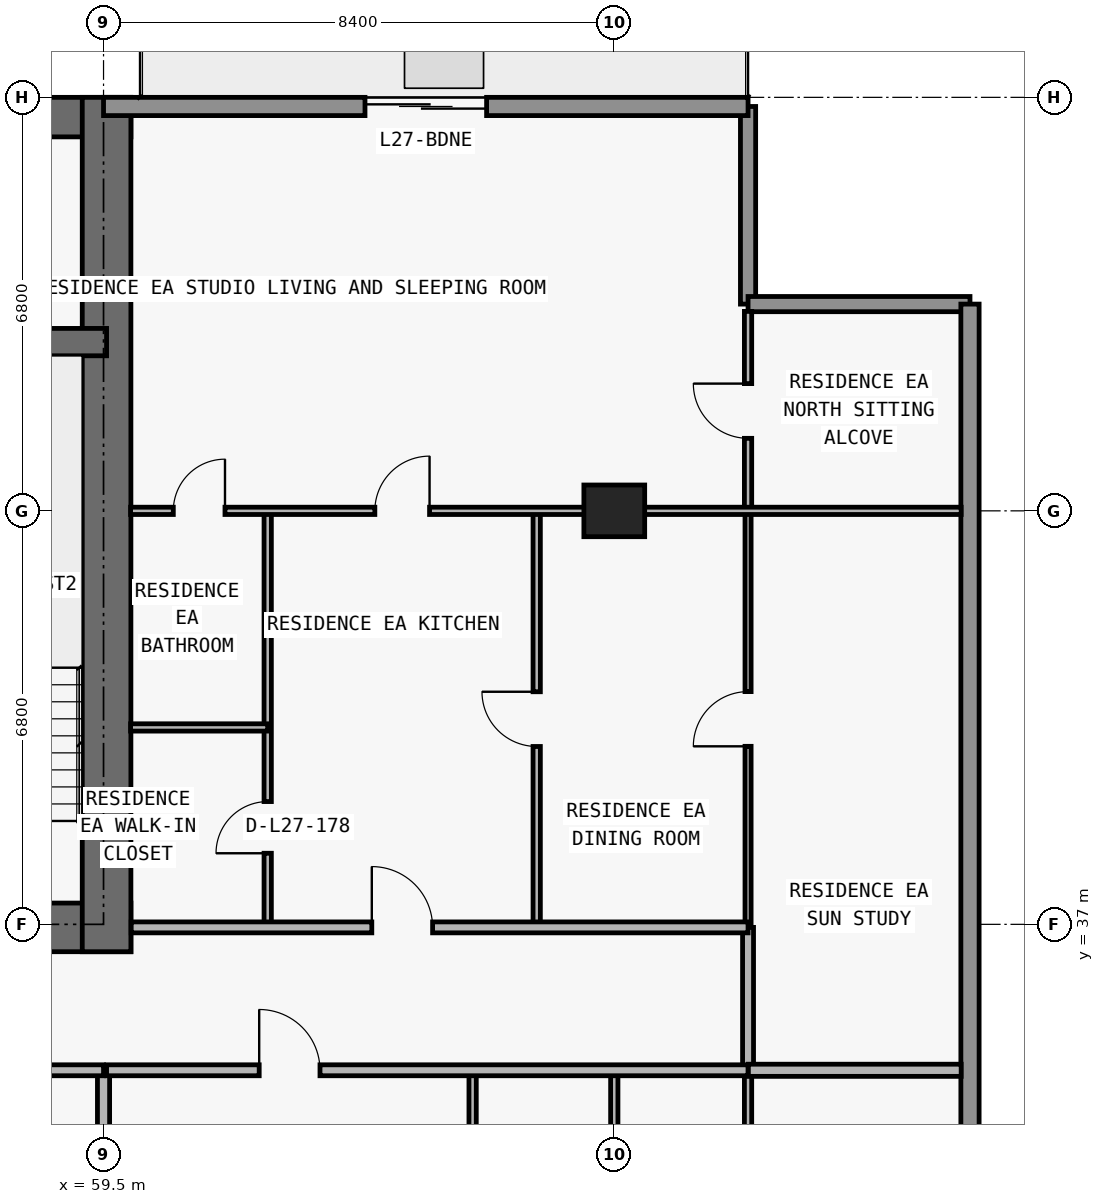
"""IFC4 building model, lengths in metres.
Left out: names, types, materials, properties, quantities, classifications, styles, units other than length and angle.
Written with IfcOpenShell. Run it as: python <this file> out.ifc"""

import sys

from ifc_helpers import new_model, si_unit, direction, frame, frame_2d, origin, origin_2d, place, context, subcontext, project, spatial, rectangle, extrude, element, fill, save


model = new_model("IFC4")
c1 = context("Model", 3, precision=1e-05, world=origin(), true_north=direction((0.0, 1.0)))
c2 = subcontext(c1, "Body", "Model", "MODEL_VIEW")
j1 = project(units=[si_unit("LENGTHUNIT", "METRE"), si_unit("PLANEANGLEUNIT", "RADIAN")], contexts=[c1])
p1 = place(None, origin())
s1 = spatial("IfcSite", under=j1, at=p1, CompositionType="ELEMENT")
p2 = place(p1, origin())
s2 = spatial("IfcBuilding", under=s1, at=p2, CompositionType="ELEMENT")
p3 = place(p2, frame((0.0, 0.0, 102.6)))
s3 = spatial("IfcBuildingStorey", under=s2, at=p3, CompositionType="ELEMENT", Elevation=102.6)
p4 = place(p3, frame((67.9, 43.8, 0.0), z_axis=(0.0, 0.0, 1.0), x_axis=(1.0, 0.0, 0.0)))
e1 = element("IfcColumn", 1, at=p4, inside=s3, PredefinedType="COLUMN", context=c2, shape_type="SweptSolid", body=[
    extrude(rectangle(XDim=1.0, YDim=0.85, at=origin_2d()), origin(), (0.0, 0.0, 1.0), 3.05),
])
p5 = place(p3, frame((17.85, 36.95, 0.0), z_axis=(0.0, 0.0, 1.0), x_axis=(1.0, 0.0, 0.0)))
e2 = element("IfcWall", 2, at=p5, inside=s3, PredefinedType="SHEAR", context=c2, shape_type="SweptSolid", body=[
    extrude(rectangle(XDim=42.1, YDim=0.8, at=frame_2d((21.05, 0.0))), origin(), (0.0, 0.0, 1.0), 3.05),
])
p6 = place(p5, frame((14.45, 0.0, 0.0)))
e3 = element("IfcOpeningElement", 3, at=p6, cuts=e2, PredefinedType="OPENING", context=c2, shape_type="SweptSolid", body=[
    extrude(rectangle(XDim=1.1, YDim=2.15, at=frame_2d((0.55, 1.075))), frame((0.0, 0.41, 0.0), z_axis=(0.0, -1.0, 0.0), x_axis=(1.0, 0.0, 0.0)), (0.0, 0.0, 1.0), 0.82),
])
p7 = place(p5, frame((6.3, 0.0, 0.0)))
e4 = element("IfcOpeningElement", 4, at=p7, cuts=e2, PredefinedType="OPENING", context=c2, shape_type="SweptSolid", body=[
    extrude(rectangle(XDim=1.05, YDim=2.15, at=frame_2d((0.525, 1.075))), frame((0.0, 0.41, 0.0), z_axis=(0.0, -1.0, 0.0), x_axis=(1.0, 0.0, 0.0)), (0.0, 0.0, 1.0), 0.82),
])
p8 = place(p5, frame((34.8, 0.0, 0.0)))
e5 = element("IfcOpeningElement", 5, at=p8, cuts=e2, PredefinedType="OPENING", context=c2, shape_type="SweptSolid", body=[
    extrude(rectangle(XDim=1.05, YDim=2.15, at=frame_2d((0.525, 1.075))), frame((0.0, 0.41, 0.0), z_axis=(0.0, -1.0, 0.0), x_axis=(1.0, 0.0, 0.0)), (0.0, 0.0, 1.0), 0.82),
])
p9 = place(p5, frame((10.913, 0.0, 0.0)))
e6 = element("IfcOpeningElement", 6, at=p9, cuts=e2, PredefinedType="OPENING", context=c2, shape_type="SweptSolid", body=[
    extrude(rectangle(XDim=1.05, YDim=2.15, at=frame_2d((0.525, 1.075))), frame((0.0, 0.41, 0.0), z_axis=(0.0, -1.0, 0.0), x_axis=(1.0, 0.0, 0.0)), (0.0, 0.0, 1.0), 0.82),
])
p10 = place(p5, frame((24.15, 0.0, 0.0)))
e7 = element("IfcOpeningElement", 7, at=p10, cuts=e2, PredefinedType="OPENING", context=c2, shape_type="SweptSolid", body=[
    extrude(rectangle(XDim=1.05, YDim=2.15, at=frame_2d((0.525, 1.075))), frame((0.0, 0.41, 0.0), z_axis=(0.0, -1.0, 0.0), x_axis=(1.0, 0.0, 0.0)), (0.0, 0.0, 1.0), 0.82),
])
p11 = place(p3, frame((17.85, 50.275, 0.0), z_axis=(0.0, 0.0, 1.0), x_axis=(1.0, 0.0, 0.0)))
e8 = element("IfcWall", 8, at=p11, inside=s3, PredefinedType="SHEAR", context=c2, shape_type="SweptSolid", body=[
    extrude(rectangle(XDim=42.1, YDim=0.65, at=frame_2d((21.05, 0.0))), origin(), (0.0, 0.0, 1.0), 3.05),
])
p12 = place(p3, frame((59.55, 36.55, 0.0), z_axis=(0.0, 0.0, 1.0), x_axis=(0.0, 1.0, 0.0)))
e9 = element("IfcWall", 9, at=p12, inside=s3, PredefinedType="SHEAR", context=c2, shape_type="SweptSolid", body=[
    extrude(rectangle(XDim=14.05, YDim=0.8, at=frame_2d((7.025, 0.0))), origin(), (0.0, 0.0, 1.0), 3.05),
])
p13 = place(p3, frame((18.25, 46.575, 0.0), z_axis=(0.0, 0.0, 1.0), x_axis=(1.0, 0.0, 0.0)))
e10 = element("IfcWall", 10, at=p13, inside=s3, PredefinedType="SHEAR", context=c2, shape_type="SweptSolid", body=[
    extrude(rectangle(XDim=41.3, YDim=0.45, at=frame_2d((20.65, 0.0))), origin(), (0.0, 0.0, 1.0), 3.05),
])
p14 = place(p13, frame((7.65, 0.0, 0.0)))
e11 = element("IfcOpeningElement", 11, at=p14, cuts=e10, PredefinedType="OPENING", context=c2, shape_type="SweptSolid", body=[
    extrude(rectangle(XDim=1.0, YDim=2.2, at=frame_2d((0.5, 1.1))), frame((0.0, 0.235, 0.0), z_axis=(0.0, -1.0, 0.0), x_axis=(1.0, 0.0, 0.0)), (0.0, 0.0, 1.0), 0.47),
])
p15 = place(p13, frame((32.675, 0.0, 0.0)))
e12 = element("IfcOpeningElement", 12, at=p15, cuts=e10, PredefinedType="OPENING", context=c2, shape_type="SweptSolid", body=[
    extrude(rectangle(XDim=1.05, YDim=2.15, at=frame_2d((0.525, 1.075))), frame((0.0, 0.235, 0.0), z_axis=(0.0, -1.0, 0.0), x_axis=(1.0, 0.0, 0.0)), (0.0, 0.0, 1.0), 0.47),
])
p16 = place(p3, frame((70.1, 50.45, 0.0), z_axis=(0.0, 0.0, 1.0), x_axis=(0.0, -1.0, 0.0)))
e13 = element("IfcWall", 13, at=p16, inside=s3, PredefinedType="ELEMENTEDWALL", context=c2, shape_type="SweptSolid", body=[
    extrude(rectangle(XDim=3.25, YDim=0.25, at=frame_2d((1.625, 0.0))), origin(), (0.0, 0.0, 1.0), 3.05),
])
p17 = place(p3, frame((70.1, 47.2, 0.0), z_axis=(0.0, 0.0, 1.0), x_axis=(1.0, 0.0, 0.0)))
e14 = element("IfcWall", 14, at=p17, inside=s3, PredefinedType="ELEMENTEDWALL", context=c2, shape_type="SweptSolid", body=[
    extrude(rectangle(XDim=3.65, YDim=0.25, at=frame_2d((1.825, 0.0))), origin(), (0.0, 0.0, 1.0), 3.05),
])
p18 = place(p3, frame((73.75, 47.2, 0.0), z_axis=(0.0, 0.0, 1.0), x_axis=(0.0, -1.0, 0.0)))
e15 = element("IfcWall", 15, at=p18, inside=s3, PredefinedType="STANDARD", context=c2, shape_type="SweptSolid", body=[
    extrude(rectangle(XDim=19.2, YDim=0.3, at=frame_2d((9.6, 0.0))), origin(), (0.0, 0.0, 1.0), 3.05),
])
p19 = place(p3, frame((59.5, 50.45, 0.0), z_axis=(0.0, 0.0, 1.0), x_axis=(1.0, 0.0, 0.0)))
e16 = element("IfcWall", 16, at=p19, inside=s3, PredefinedType="STANDARD", context=c2, shape_type="SweptSolid", body=[
    extrude(rectangle(XDim=10.6, YDim=0.3, at=frame_2d((5.3, 0.0))), origin(), (0.0, 0.0, 1.0), 3.05),
])
p20 = place(p19, frame((4.3, 0.0, 0.0)))
e17 = element("IfcOpeningElement", 17, at=p20, cuts=e16, PredefinedType="OPENING", context=c2, shape_type="SweptSolid", body=[
    extrude(rectangle(XDim=2.0, YDim=2.3, at=frame_2d((1.0, 1.15))), frame((0.0, 0.16, 0.0), z_axis=(0.0, -1.0, 0.0), x_axis=(1.0, 0.0, 0.0)), (0.0, 0.0, 1.0), 0.32),
])
p21 = place(p3, frame((59.5, 30.24, 0.0), z_axis=(0.0, 0.0, 1.0), x_axis=(0.0, 1.0, 0.0)))
e18 = element("IfcWall", 18, at=p21, inside=s3, PredefinedType="PARTITIONING", context=c2, shape_type="SweptSolid", body=[
    extrude(rectangle(XDim=4.36, YDim=0.2, at=frame_2d((2.18, 0.0))), origin(), (0.0, 0.0, 1.0), 2.174),
])
p22 = place(p3, frame((62.2, 36.95, 0.0), z_axis=(0.0, 0.0, 1.0), x_axis=(0.0, 1.0, 0.0)))
e19 = element("IfcWall", 19, at=p22, inside=s3, PredefinedType="PARTITIONING", context=c2, shape_type="SweptSolid", body=[
    extrude(rectangle(XDim=6.85, YDim=0.12, at=frame_2d((3.425, 0.0))), origin(), (0.0, 0.0, 1.0), 3.05),
])
p23 = place(p22, frame((1.219, 0.0, 0.0)))
e20 = element("IfcOpeningElement", 20, at=p23, cuts=e19, PredefinedType="OPENING", context=c2, shape_type="SweptSolid", body=[
    extrude(rectangle(XDim=0.85, YDim=2.1, at=frame_2d((0.425, 1.05))), frame((0.0, 0.07, 0.0), z_axis=(0.0, -1.0, 0.0), x_axis=(1.0, 0.0, 0.0)), (0.0, 0.0, 1.0), 0.14),
])
p24 = place(p3, frame((65.57, 30.24, 0.0), z_axis=(0.0, 0.0, 1.0), x_axis=(0.0, 1.0, 0.0)))
e21 = element("IfcWall", 21, at=p24, inside=s3, PredefinedType="PARTITIONING", context=c2, shape_type="SweptSolid", body=[
    extrude(rectangle(XDim=4.36, YDim=0.12, at=frame_2d((2.18, 0.0))), origin(), (0.0, 0.0, 1.0), 3.05),
])
p25 = place(p24, frame((1.755, 0.0, 0.0)))
e22 = element("IfcOpeningElement", 22, at=p25, cuts=e21, PredefinedType="OPENING", context=c2, shape_type="SweptSolid", body=[
    extrude(rectangle(XDim=0.85, YDim=2.1, at=frame_2d((0.425, 1.05))), frame((0.0, 0.07, 0.0), z_axis=(0.0, -1.0, 0.0), x_axis=(1.0, 0.0, 0.0)), (0.0, 0.0, 1.0), 0.14),
])
p26 = place(p3, frame((66.624, 36.95, 0.0), z_axis=(0.0, 0.0, 1.0), x_axis=(0.0, 1.0, 0.0)))
e23 = element("IfcWall", 23, at=p26, inside=s3, PredefinedType="PARTITIONING", context=c2, shape_type="SweptSolid", body=[
    extrude(rectangle(XDim=6.85, YDim=0.12, at=frame_2d((3.425, 0.0))), origin(), (0.0, 0.0, 1.0), 3.05),
])
p27 = place(p26, frame((2.975, 0.0, 0.0)))
e24 = element("IfcOpeningElement", 24, at=p27, cuts=e23, PredefinedType="OPENING", context=c2, shape_type="SweptSolid", body=[
    extrude(rectangle(XDim=0.9, YDim=2.15, at=frame_2d((0.45, 1.075))), frame((0.0, 0.07, 0.0), z_axis=(0.0, -1.0, 0.0), x_axis=(1.0, 0.0, 0.0)), (0.0, 0.0, 1.0), 0.14),
])
p28 = place(p3, frame((67.9, 30.24, 0.0), z_axis=(0.0, 0.0, 1.0), x_axis=(0.0, 1.0, 0.0)))
e25 = element("IfcWall", 25, at=p28, inside=s3, PredefinedType="PARTITIONING", context=c2, shape_type="SweptSolid", body=[
    extrude(rectangle(XDim=4.36, YDim=0.12, at=frame_2d((2.18, 0.0))), origin(), (0.0, 0.0, 1.0), 2.174),
])
p29 = place(p3, frame((70.1, 30.24, 0.0), z_axis=(0.0, 0.0, 1.0), x_axis=(0.0, 1.0, 0.0)))
e26 = element("IfcWall", 26, at=p29, inside=s3, PredefinedType="PARTITIONING", context=c2, shape_type="SweptSolid", body=[
    extrude(rectangle(XDim=4.36, YDim=0.12, at=frame_2d((2.18, 0.0))), origin(), (0.0, 0.0, 1.0), 3.05),
])
p30 = place(p3, frame((70.1, 34.605, 0.0), z_axis=(0.0, 0.0, 1.0), x_axis=(0.0, 1.0, 0.0)))
e27 = element("IfcWall", 27, at=p30, inside=s3, PredefinedType="PARTITIONING", context=c2, shape_type="SweptSolid", body=[
    extrude(rectangle(XDim=2.345, YDim=0.18, at=frame_2d((1.172, 0.0))), origin(), (0.0, 0.0, 1.0), 3.05),
])
p31 = place(p3, frame((70.1, 36.955, 0.0), z_axis=(0.0, 0.0, 1.0), x_axis=(0.0, 1.0, 0.0)))
e28 = element("IfcWall", 28, at=p31, inside=s3, PredefinedType="MOVABLE", context=c2, shape_type="SweptSolid", body=[
    extrude(rectangle(XDim=6.845, YDim=0.1, at=frame_2d((3.422, 0.0))), origin(), (0.0, 0.0, 1.0), 3.05),
])
p32 = place(p31, frame((2.972, 0.0, 0.0)))
e29 = element("IfcOpeningElement", 29, at=p32, cuts=e28, PredefinedType="OPENING", context=c2, shape_type="SweptSolid", body=[
    extrude(rectangle(XDim=0.9, YDim=2.15, at=frame_2d((0.45, 1.075))), frame((0.0, 0.06, 0.0), z_axis=(0.0, -1.0, 0.0), x_axis=(1.0, 0.0, 0.0)), (0.0, 0.0, 1.0), 0.12),
])
p33 = place(p3, frame((70.1, 43.805, 0.0), z_axis=(0.0, 0.0, 1.0), x_axis=(0.0, 1.0, 0.0)))
e30 = element("IfcWall", 30, at=p33, inside=s3, PredefinedType="PARTITIONING", context=c2, shape_type="SweptSolid", body=[
    extrude(rectangle(XDim=3.275, YDim=0.12, at=frame_2d((1.638, 0.0))), origin(), (0.0, 0.0, 1.0), 3.05),
])
p34 = place(p33, frame((1.188, 0.0, 0.0)))
e31 = element("IfcOpeningElement", 31, at=p34, cuts=e30, PredefinedType="OPENING", context=c2, shape_type="SweptSolid", body=[
    extrude(rectangle(XDim=0.9, YDim=2.15, at=frame_2d((0.45, 1.075))), frame((0.0, 0.07, 0.0), z_axis=(0.0, -1.0, 0.0), x_axis=(1.0, 0.0, 0.0)), (0.0, 0.0, 1.0), 0.14),
])
p35 = place(p3, frame((18.3, 34.6, 0.0), z_axis=(0.0, 0.0, 1.0), x_axis=(1.0, 0.0, 0.0)))
e32 = element("IfcWall", 32, at=p35, inside=s3, PredefinedType="PARTITIONING", context=c2, shape_type="SweptSolid", body=[
    extrude(rectangle(XDim=41.2, YDim=0.18, at=frame_2d((20.6, 0.0))), origin(), (0.0, 0.0, 1.0), 3.05),
])
p36 = place(p35, frame((2.691, 0.0, 0.0)))
e33 = element("IfcOpeningElement", 33, at=p36, cuts=e32, PredefinedType="OPENING", context=c2, shape_type="SweptSolid", body=[
    extrude(rectangle(XDim=1.0, YDim=2.2, at=frame_2d((0.5, 1.1))), frame((0.0, 0.1, 0.0), z_axis=(0.0, -1.0, 0.0), x_axis=(1.0, 0.0, 0.0)), (0.0, 0.0, 1.0), 0.2),
])
p37 = place(p35, frame((11.212, 0.0, 0.0)))
e34 = element("IfcOpeningElement", 34, at=p37, cuts=e32, PredefinedType="OPENING", context=c2, shape_type="SweptSolid", body=[
    extrude(rectangle(XDim=1.0, YDim=2.2, at=frame_2d((0.5, 1.1))), frame((0.0, 0.1, 0.0), z_axis=(0.0, -1.0, 0.0), x_axis=(1.0, 0.0, 0.0)), (0.0, 0.0, 1.0), 0.2),
])
p38 = place(p35, frame((35.504, 0.0, 0.0)))
e35 = element("IfcOpeningElement", 35, at=p38, cuts=e32, PredefinedType="OPENING", context=c2, shape_type="SweptSolid", body=[
    extrude(rectangle(XDim=1.0, YDim=2.2, at=frame_2d((0.5, 1.1))), frame((0.0, 0.1, 0.0), z_axis=(0.0, -1.0, 0.0), x_axis=(1.0, 0.0, 0.0)), (0.0, 0.0, 1.0), 0.2),
])
p39 = place(p3, frame((59.55, 34.6, 0.0), z_axis=(0.0, 0.0, 1.0), x_axis=(1.0, 0.0, 0.0)))
e36 = element("IfcWall", 36, at=p39, inside=s3, PredefinedType="PARTITIONING", context=c2, shape_type="SweptSolid", body=[
    extrude(rectangle(XDim=10.55, YDim=0.18, at=frame_2d((5.275, 0.0))), origin(), (0.0, 0.0, 1.0), 3.05),
])
p40 = place(p39, frame((2.51, 0.0, 0.0)))
e37 = element("IfcOpeningElement", 37, at=p40, cuts=e36, PredefinedType="OPENING", context=c2, shape_type="SweptSolid", body=[
    extrude(rectangle(XDim=1.0, YDim=2.2, at=frame_2d((0.5, 1.1))), frame((0.0, 0.1, 0.0), z_axis=(0.0, -1.0, 0.0), x_axis=(1.0, 0.0, 0.0)), (0.0, 0.0, 1.0), 0.2),
])
p41 = place(p3, frame((70.105, 34.6, 0.0), z_axis=(0.0, 0.0, 1.0), x_axis=(1.0, 0.0, 0.0)))
e38 = element("IfcWall", 38, at=p41, inside=s3, PredefinedType="PARTITIONING", context=c2, shape_type="SweptSolid", body=[
    extrude(rectangle(XDim=3.5, YDim=0.2, at=frame_2d((1.75, 0.0))), origin(), (0.0, 0.0, 1.0), 3.05),
])
p42 = place(p3, frame((59.955, 36.95, 0.0), z_axis=(0.0, 0.0, 1.0), x_axis=(1.0, 0.0, 0.0)))
e39 = element("IfcWall", 39, at=p42, inside=s3, PredefinedType="PARTITIONING", context=c2, shape_type="SweptSolid", body=[
    extrude(rectangle(XDim=10.145, YDim=0.18, at=frame_2d((5.073, 0.0))), origin(), (0.0, 0.0, 1.0), 3.05),
])
p43 = place(p42, frame((3.957, 0.0, 0.0)))
e40 = element("IfcOpeningElement", 40, at=p43, cuts=e39, PredefinedType="OPENING", context=c2, shape_type="SweptSolid", body=[
    extrude(rectangle(XDim=1.0, YDim=2.2, at=frame_2d((0.5, 1.1))), frame((0.0, 0.1, 0.0), z_axis=(0.0, -1.0, 0.0), x_axis=(1.0, 0.0, 0.0)), (0.0, 0.0, 1.0), 0.2),
])
p44 = place(p3, frame((59.945, 40.238, 0.0), z_axis=(0.0, 0.0, 1.0), x_axis=(1.0, 0.0, 0.0)))
e41 = element("IfcWall", 41, at=p44, inside=s3, PredefinedType="PARTITIONING", context=c2, shape_type="SweptSolid", body=[
    extrude(rectangle(XDim=2.255, YDim=0.12, at=frame_2d((1.127, 0.0))), origin(), (0.0, 0.0, 1.0), 3.05),
])
p45 = place(p3, frame((59.945, 43.8, 0.0), z_axis=(0.0, 0.0, 1.0), x_axis=(1.0, 0.0, 0.0)))
e42 = element("IfcWall", 42, at=p45, inside=s3, PredefinedType="PARTITIONING", context=c2, shape_type="SweptSolid", body=[
    extrude(rectangle(XDim=13.66, YDim=0.12, at=frame_2d((6.83, 0.0))), origin(), (0.0, 0.0, 1.0), 2.339),
])
p46 = place(p45, frame((4.017, 0.0, 0.0)))
e43 = element("IfcOpeningElement", 43, at=p46, cuts=e42, PredefinedType="OPENING", context=c2, shape_type="SweptSolid", body=[
    extrude(rectangle(XDim=0.9, YDim=2.15, at=frame_2d((0.45, 1.075))), frame((0.0, 0.07, 0.0), z_axis=(0.0, -1.0, 0.0), x_axis=(1.0, 0.0, 0.0)), (0.0, 0.0, 1.0), 0.14),
])
p47 = place(p45, frame((0.702, 0.0, 0.0)))
e44 = element("IfcOpeningElement", 44, at=p47, cuts=e42, PredefinedType="OPENING", context=c2, shape_type="SweptSolid", body=[
    extrude(rectangle(XDim=0.85, YDim=2.1, at=frame_2d((0.425, 1.05))), frame((0.0, 0.07, 0.0), z_axis=(0.0, -1.0, 0.0), x_axis=(1.0, 0.0, 0.0)), (0.0, 0.0, 1.0), 0.14),
])
p48 = place(p20, origin())
e45 = element("IfcDoor", 45, at=p48, inside=s3, OperationType="DOUBLE_DOOR_SLIDING", PredefinedType="DOOR", context=c2, shape_type="SweptSolid", body=[
    extrude(rectangle(XDim=2.0, YDim=2.3, at=frame_2d((1.0, 1.15))), frame((0.0, 0.025, 0.0), z_axis=(0.0, -1.0, 0.0), x_axis=(1.0, 0.0, 0.0)), (0.0, 0.0, 1.0), 0.05),
])
fill(e17, e45)
p49 = place(p40, origin())
e46 = element("IfcDoor", 46, at=p49, inside=s3, OperationType="SINGLE_SWING_LEFT", PredefinedType="DOOR", context=c2, shape_type="SweptSolid", body=[
    extrude(rectangle(XDim=1.0, YDim=2.2, at=frame_2d((0.5, 1.1))), frame((0.0, 0.025, 0.0), z_axis=(0.0, -1.0, 0.0), x_axis=(1.0, 0.0, 0.0)), (0.0, 0.0, 1.0), 0.05),
])
fill(e37, e46)
p50 = place(p27, origin())
e47 = element("IfcDoor", 47, at=p50, inside=s3, OperationType="SINGLE_SWING_RIGHT", PredefinedType="DOOR", context=c2, shape_type="SweptSolid", body=[
    extrude(rectangle(XDim=0.9, YDim=2.15, at=frame_2d((0.45, 1.075))), frame((0.0, 0.025, 0.0), z_axis=(0.0, -1.0, 0.0), x_axis=(1.0, 0.0, 0.0)), (0.0, 0.0, 1.0), 0.05),
])
fill(e24, e47)
p51 = place(p43, origin())
e48 = element("IfcDoor", 48, at=p51, inside=s3, OperationType="SINGLE_SWING_LEFT", PredefinedType="DOOR", context=c2, shape_type="SweptSolid", body=[
    extrude(rectangle(XDim=1.0, YDim=2.2, at=frame_2d((0.5, 1.1))), frame((0.0, 0.025, 0.0), z_axis=(0.0, -1.0, 0.0), x_axis=(1.0, 0.0, 0.0)), (0.0, 0.0, 1.0), 0.05),
])
fill(e40, e48)
p52 = place(p46, origin())
e49 = element("IfcDoor", 49, at=p52, inside=s3, OperationType="SINGLE_SWING_RIGHT", PredefinedType="DOOR", context=c2, shape_type="SweptSolid", body=[
    extrude(rectangle(XDim=0.9, YDim=2.15, at=frame_2d((0.45, 1.075))), frame((0.0, 0.025, 0.0), z_axis=(0.0, -1.0, 0.0), x_axis=(1.0, 0.0, 0.0)), (0.0, 0.0, 1.0), 0.05),
])
fill(e43, e49)
p53 = place(p23, origin())
e50 = element("IfcDoor", 50, at=p53, inside=s3, OperationType="SINGLE_SWING_LEFT", PredefinedType="DOOR", context=c2, shape_type="SweptSolid", body=[
    extrude(rectangle(XDim=0.85, YDim=2.1, at=frame_2d((0.425, 1.05))), frame((0.0, 0.025, 0.0), z_axis=(0.0, -1.0, 0.0), x_axis=(1.0, 0.0, 0.0)), (0.0, 0.0, 1.0), 0.05),
])
fill(e20, e50)
p54 = place(p47, origin())
e51 = element("IfcDoor", 51, at=p54, inside=s3, OperationType="SINGLE_SWING_RIGHT", PredefinedType="DOOR", context=c2, shape_type="SweptSolid", body=[
    extrude(rectangle(XDim=0.85, YDim=2.1, at=frame_2d((0.425, 1.05))), frame((0.0, 0.025, 0.0), z_axis=(0.0, -1.0, 0.0), x_axis=(1.0, 0.0, 0.0)), (0.0, 0.0, 1.0), 0.05),
])
fill(e44, e51)
p55 = place(p32, origin())
e52 = element("IfcDoor", 52, at=p55, inside=s3, OperationType="SINGLE_SWING_LEFT", PredefinedType="DOOR", context=c2, shape_type="SweptSolid", body=[
    extrude(rectangle(XDim=0.9, YDim=2.15, at=frame_2d((0.45, 1.075))), frame((0.0, 0.025, 0.0), z_axis=(0.0, -1.0, 0.0), x_axis=(1.0, 0.0, 0.0)), (0.0, 0.0, 1.0), 0.05),
])
fill(e29, e52)
p56 = place(p34, origin())
e53 = element("IfcDoor", 53, at=p56, inside=s3, OperationType="SINGLE_SWING_RIGHT", PredefinedType="DOOR", context=c2, shape_type="SweptSolid", body=[
    extrude(rectangle(XDim=0.9, YDim=2.15, at=frame_2d((0.45, 1.075))), frame((0.0, 0.025, 0.0), z_axis=(0.0, -1.0, 0.0), x_axis=(1.0, 0.0, 0.0)), (0.0, 0.0, 1.0), 0.05),
])
fill(e31, e53)
save(model, sys.argv[1])
